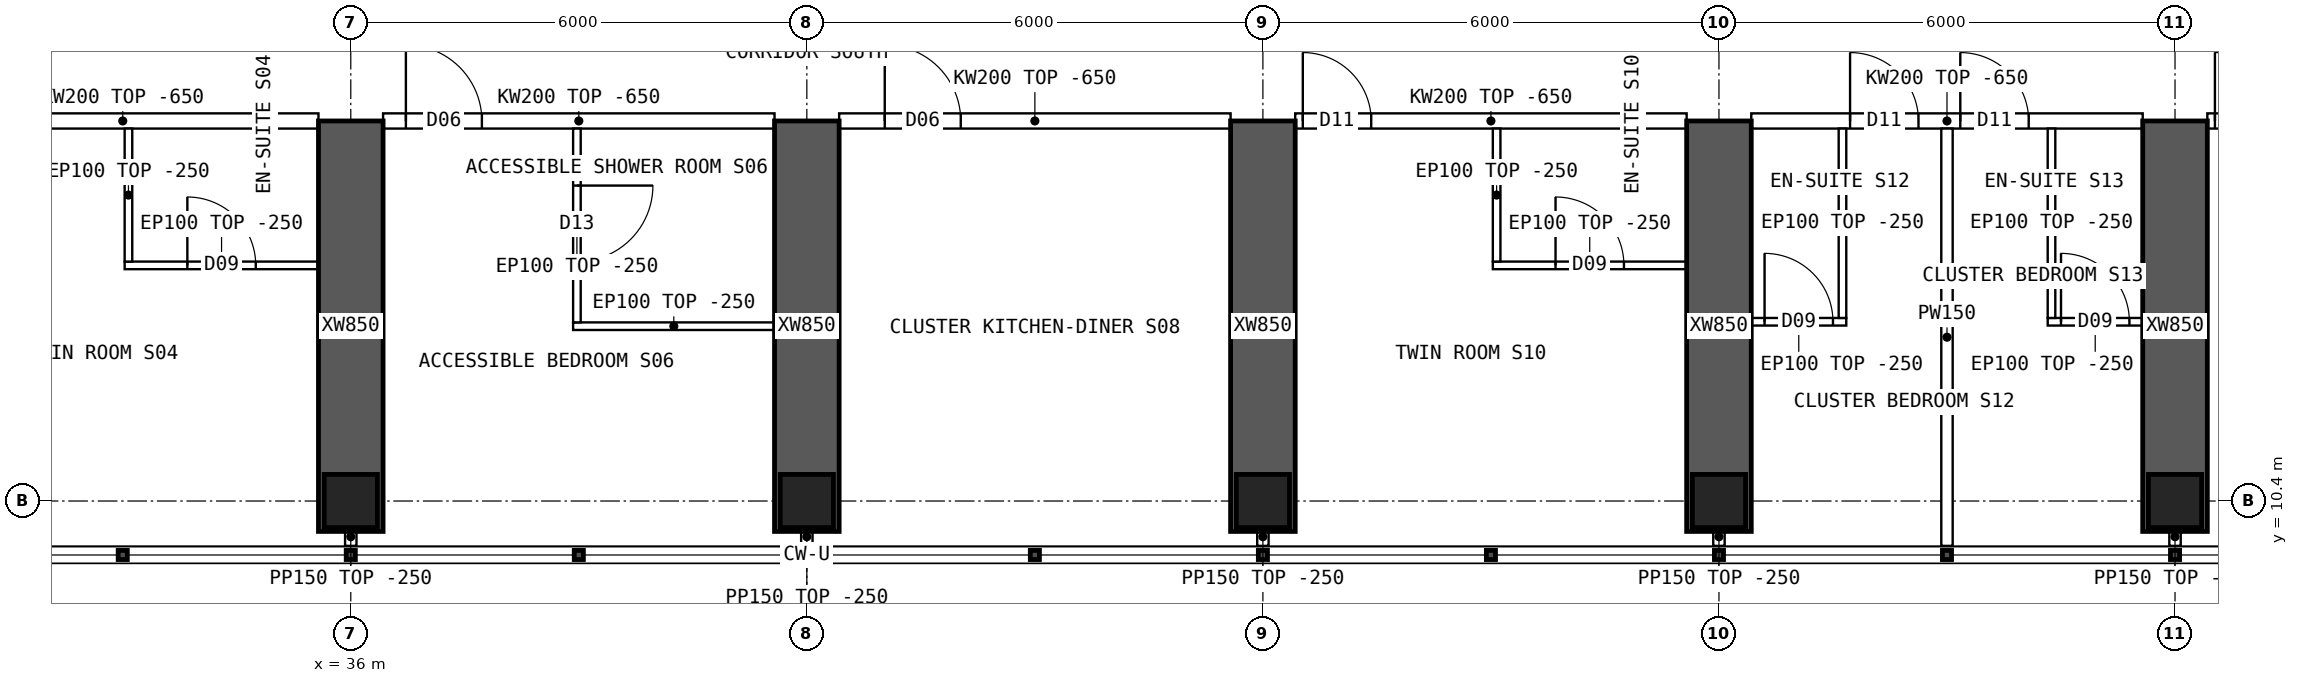
"""IFC4 building model, lengths in metres.
Left out: names, types, materials, properties, quantities, classifications, styles, units other than length and angle.
Written with IfcOpenShell. Run it as: python <this file> out.ifc"""

import sys

from ifc_helpers import new_model, si_unit, direction, frame, frame_2d, origin, origin_2d, place, context, subcontext, project, spatial, polyline, rectangle, hollow_rectangle, outline, extrude, element, fill, save


model = new_model("IFC4")
c1 = context("Model", 3, precision=1e-05, world=origin(), true_north=direction((0.0, 1.0)))
c2 = subcontext(c1, "Body", "Model", "MODEL_VIEW")
j1 = project(units=[si_unit("LENGTHUNIT", "METRE"), si_unit("PLANEANGLEUNIT", "RADIAN")], contexts=[c1])
p1 = place(None, origin())
s1 = spatial("IfcSite", under=j1, at=p1, CompositionType="ELEMENT")
p2 = place(p1, origin())
s2 = spatial("IfcBuilding", under=s1, at=p2, CompositionType="ELEMENT")
p3 = place(p2, frame((0.0, 0.0, 193.6)))
s3 = spatial("IfcBuildingStorey", under=s2, at=p3, CompositionType="ELEMENT", Elevation=193.6)
for number, where, z_axis, x_axis in (
    (1, (36.0, 10.4, 0.0), (0.0, 0.0, 1.0), (1.0, 0.0, 0.0)),
    (2, (42.0, 10.4, 0.0), (0.0, 0.0, 1.0), (1.0, 0.0, 0.0)),
    (3, (48.0, 10.4, 0.0), (0.0, 0.0, 1.0), (1.0, 0.0, 0.0)),
    (4, (54.0, 10.4, 0.0), (0.0, 0.0, 1.0), (1.0, 0.0, 0.0)),
    (5, (60.0, 10.4, 0.0), (0.0, 0.0, 1.0), (1.0, 0.0, 0.0)),
):
    element("IfcColumn", number, at=place(p3, frame(where, z_axis=z_axis, x_axis=x_axis)), inside=s3, PredefinedType="COLUMN", context=c2, shape_type="SweptSolid", body=[
        extrude(hollow_rectangle(XDim=0.7, YDim=0.7, WallThickness=0.07, at=origin_2d()), origin(), (0.0, 0.0, 1.0), 3.75),
    ])
for number, where, z_axis, x_axis in (
    (6, (36.0, 10.0, 0.0), (0.0, 0.0, 1.0), (0.0, 1.0, 0.0)),
    (7, (42.0, 10.0, 0.0), (0.0, 0.0, 1.0), (0.0, 1.0, 0.0)),
    (8, (48.0, 10.0, 0.0), (0.0, 0.0, 1.0), (0.0, 1.0, 0.0)),
    (9, (54.0, 10.0, 0.0), (0.0, 0.0, 1.0), (0.0, 1.0, 0.0)),
    (10, (60.0, 10.0, 0.0), (0.0, 0.0, 1.0), (0.0, 1.0, 0.0)),
):
    element("IfcWall", number, at=place(p3, frame(where, z_axis=z_axis, x_axis=x_axis)), inside=s3, PredefinedType="SHEAR", context=c2, shape_type="SweptSolid", body=[
        extrude(rectangle(XDim=5.4, YDim=0.85, at=frame_2d((2.7, 0.0))), origin(), (0.0, 0.0, 1.0), 3.75),
    ])
p4 = place(p3, frame((30.425, 15.4, 0.0), z_axis=(0.0, 0.0, 1.0), x_axis=(1.0, 0.0, 0.0)))
e11 = element("IfcWall", 11, at=p4, inside=s3, PredefinedType="SOLIDWALL", context=c2, shape_type="SweptSolid", body=[
    extrude(outline(polyline([(0.0, 0.0), (5.15, 0.0), (5.15, 3.1), (0.0, 3.1), (0.0, 0.0)])), frame((0.0, 0.1, 0.0), z_axis=(0.0, -1.0, 0.0), x_axis=(1.0, 0.0, 0.0)), (0.0, 0.0, 1.0), 0.2),
])
p5 = place(p4, frame((0.1, 0.0, 0.0)))
e12 = element("IfcOpeningElement", 12, at=p5, cuts=e11, PredefinedType="OPENING", context=c2, shape_type="SweptSolid", body=[
    extrude(rectangle(XDim=0.9, YDim=2.1, at=frame_2d((0.45, 1.05))), frame((0.0, 0.11, 0.0), z_axis=(0.0, -1.0, 0.0), x_axis=(1.0, 0.0, 0.0)), (0.0, 0.0, 1.0), 0.22),
])
p6 = place(p3, frame((36.425, 15.4, 0.0), z_axis=(0.0, 0.0, 1.0), x_axis=(1.0, 0.0, 0.0)))
e13 = element("IfcWall", 13, at=p6, inside=s3, PredefinedType="SOLIDWALL", context=c2, shape_type="SweptSolid", body=[
    extrude(outline(polyline([(0.0, 0.0), (5.15, 0.0), (5.15, 3.1), (0.0, 3.1), (0.0, 0.0)])), frame((0.0, 0.1, 0.0), z_axis=(0.0, -1.0, 0.0), x_axis=(1.0, 0.0, 0.0)), (0.0, 0.0, 1.0), 0.2),
])
p7 = place(p6, frame((0.3, 0.0, 0.0)))
e14 = element("IfcOpeningElement", 14, at=p7, cuts=e13, PredefinedType="OPENING", context=c2, shape_type="SweptSolid", body=[
    extrude(rectangle(XDim=1.0, YDim=2.1, at=frame_2d((0.5, 1.05))), frame((0.0, 0.11, 0.0), z_axis=(0.0, -1.0, 0.0), x_axis=(1.0, 0.0, 0.0)), (0.0, 0.0, 1.0), 0.22),
])
p8 = place(p3, frame((42.425, 15.4, 0.0), z_axis=(0.0, 0.0, 1.0), x_axis=(1.0, 0.0, 0.0)))
e15 = element("IfcWall", 15, at=p8, inside=s3, PredefinedType="SOLIDWALL", context=c2, shape_type="SweptSolid", body=[
    extrude(outline(polyline([(0.0, 0.0), (5.15, 0.0), (5.15, 3.1), (0.0, 3.1), (0.0, 0.0)])), frame((0.0, 0.1, 0.0), z_axis=(0.0, -1.0, 0.0), x_axis=(1.0, 0.0, 0.0)), (0.0, 0.0, 1.0), 0.2),
])
p9 = place(p8, frame((0.6, 0.0, 0.0)))
e16 = element("IfcOpeningElement", 16, at=p9, cuts=e15, PredefinedType="OPENING", context=c2, shape_type="SweptSolid", body=[
    extrude(rectangle(XDim=1.0, YDim=2.1, at=frame_2d((0.5, 1.05))), frame((0.0, 0.11, 0.0), z_axis=(0.0, -1.0, 0.0), x_axis=(1.0, 0.0, 0.0)), (0.0, 0.0, 1.0), 0.22),
])
p10 = place(p3, frame((48.425, 15.4, 0.0), z_axis=(0.0, 0.0, 1.0), x_axis=(1.0, 0.0, 0.0)))
e17 = element("IfcWall", 17, at=p10, inside=s3, PredefinedType="SOLIDWALL", context=c2, shape_type="SweptSolid", body=[
    extrude(outline(polyline([(0.0, 0.0), (5.15, 0.0), (5.15, 3.1), (0.0, 3.1), (0.0, 0.0)])), frame((0.0, 0.1, 0.0), z_axis=(0.0, -1.0, 0.0), x_axis=(1.0, 0.0, 0.0)), (0.0, 0.0, 1.0), 0.2),
])
p11 = place(p10, frame((0.1, 0.0, 0.0)))
e18 = element("IfcOpeningElement", 18, at=p11, cuts=e17, PredefinedType="OPENING", context=c2, shape_type="SweptSolid", body=[
    extrude(rectangle(XDim=0.9, YDim=2.1, at=frame_2d((0.45, 1.05))), frame((0.0, 0.11, 0.0), z_axis=(0.0, -1.0, 0.0), x_axis=(1.0, 0.0, 0.0)), (0.0, 0.0, 1.0), 0.22),
])
p12 = place(p3, frame((54.425, 15.4, 0.0), z_axis=(0.0, 0.0, 1.0), x_axis=(1.0, 0.0, 0.0)))
e19 = element("IfcWall", 19, at=p12, inside=s3, PredefinedType="SOLIDWALL", context=c2, shape_type="SweptSolid", body=[
    extrude(outline(polyline([(0.0, 0.0), (5.15, 0.0), (5.15, 3.1), (0.0, 3.1), (0.0, 0.0)])), frame((0.0, 0.1, 0.0), z_axis=(0.0, -1.0, 0.0), x_axis=(1.0, 0.0, 0.0)), (0.0, 0.0, 1.0), 0.2),
])
p13 = place(p12, frame((1.3, 0.0, 0.0)))
e20 = element("IfcOpeningElement", 20, at=p13, cuts=e19, PredefinedType="OPENING", context=c2, shape_type="SweptSolid", body=[
    extrude(rectangle(XDim=0.9, YDim=2.1, at=frame_2d((0.45, 1.05))), frame((0.0, 0.11, 0.0), z_axis=(0.0, -1.0, 0.0), x_axis=(1.0, 0.0, 0.0)), (0.0, 0.0, 1.0), 0.22),
])
p14 = place(p12, frame((2.75, 0.0, 0.0)))
e21 = element("IfcOpeningElement", 21, at=p14, cuts=e19, PredefinedType="OPENING", context=c2, shape_type="SweptSolid", body=[
    extrude(rectangle(XDim=0.9, YDim=2.1, at=frame_2d((0.45, 1.05))), frame((0.0, 0.11, 0.0), z_axis=(0.0, -1.0, 0.0), x_axis=(1.0, 0.0, 0.0)), (0.0, 0.0, 1.0), 0.22),
])
p15 = place(p3, frame((60.425, 15.4, 0.0), z_axis=(0.0, 0.0, 1.0), x_axis=(1.0, 0.0, 0.0)))
e22 = element("IfcWall", 22, at=p15, inside=s3, PredefinedType="SOLIDWALL", context=c2, shape_type="SweptSolid", body=[
    extrude(outline(polyline([(0.0, 0.0), (5.15, 0.0), (5.15, 3.1), (0.0, 3.1), (0.0, 0.0)])), frame((0.0, 0.1, 0.0), z_axis=(0.0, -1.0, 0.0), x_axis=(1.0, 0.0, 0.0)), (0.0, 0.0, 1.0), 0.2),
])
p16 = place(p15, frame((0.1, 0.0, 0.0)))
e23 = element("IfcOpeningElement", 23, at=p16, cuts=e22, PredefinedType="OPENING", context=c2, shape_type="SweptSolid", body=[
    extrude(rectangle(XDim=0.9, YDim=2.1, at=frame_2d((0.45, 1.05))), frame((0.0, 0.11, 0.0), z_axis=(0.0, -1.0, 0.0), x_axis=(1.0, 0.0, 0.0)), (0.0, 0.0, 1.0), 0.22),
])
p17 = place(p3, frame((35.575, 13.5, 0.0), z_axis=(0.0, 0.0, 1.0), x_axis=(-1.0, 0.0, 0.0)))
e24 = element("IfcWall", 24, at=p17, inside=s3, PredefinedType="PARTITIONING", context=c2, shape_type="SweptSolid", body=[
    extrude(rectangle(XDim=2.55, YDim=0.1, at=frame_2d((1.275, 0.0))), origin(), (0.0, 0.0, 1.0), 3.5),
])
p18 = place(p17, frame((0.825, 0.0, 0.0)))
e25 = element("IfcOpeningElement", 25, at=p18, cuts=e24, PredefinedType="OPENING", context=c2, shape_type="SweptSolid", body=[
    extrude(rectangle(XDim=0.9, YDim=2.1, at=frame_2d((0.45, 1.05))), frame((0.0, 0.06, 0.0), z_axis=(0.0, -1.0, 0.0), x_axis=(1.0, 0.0, 0.0)), (0.0, 0.0, 1.0), 0.12),
])
p19 = place(p3, frame((33.075, 13.55, 0.0), z_axis=(0.0, 0.0, 1.0), x_axis=(0.0, 1.0, 0.0)))
e26 = element("IfcWall", 26, at=p19, inside=s3, PredefinedType="PARTITIONING", context=c2, shape_type="SweptSolid", body=[
    extrude(outline(polyline([(0.0, 0.0), (1.75, 0.0), (1.75, 3.1), (1.702, 3.1), (1.7, 3.5), (0.0, 3.5), (0.0, 0.0)])), frame((0.0, 0.05, 0.0), z_axis=(0.0, -1.0, 0.0), x_axis=(1.0, 0.0, 0.0)), (0.0, 0.0, 1.0), 0.1),
])
p20 = place(p3, frame((38.925, 12.7, 0.0), z_axis=(0.0, 0.0, 1.0), x_axis=(1.0, 0.0, 0.0)))
e27 = element("IfcWall", 27, at=p20, inside=s3, PredefinedType="PARTITIONING", context=c2, shape_type="SweptSolid", body=[
    extrude(rectangle(XDim=2.65, YDim=0.1, at=frame_2d((1.325, 0.0))), origin(), (0.0, 0.0, 1.0), 3.5),
])
p21 = place(p3, frame((38.975, 12.75, 0.0), z_axis=(0.0, 0.0, 1.0), x_axis=(0.0, 1.0, 0.0)))
e28 = element("IfcWall", 28, at=p21, inside=s3, PredefinedType="PARTITIONING", context=c2, shape_type="SweptSolid", body=[
    extrude(outline(polyline([(0.0, 0.0), (2.55, 0.0), (2.55, 3.1), (2.502, 3.1), (2.5, 3.5), (0.0, 3.5), (0.0, 0.0)])), frame((0.0, 0.05, 0.0), z_axis=(0.0, -1.0, 0.0), x_axis=(1.0, 0.0, 0.0)), (0.0, 0.0, 1.0), 0.1),
])
p22 = place(p21, frame((0.8, 0.0, 0.0)))
e29 = element("IfcOpeningElement", 29, at=p22, cuts=e28, PredefinedType="OPENING", context=c2, shape_type="SweptSolid", body=[
    extrude(rectangle(XDim=1.0, YDim=2.1, at=frame_2d((0.5, 1.05))), frame((0.0, 0.06, 0.0), z_axis=(0.0, -1.0, 0.0), x_axis=(1.0, 0.0, 0.0)), (0.0, 0.0, 1.0), 0.12),
])
p23 = place(p3, frame((53.575, 13.5, 0.0), z_axis=(0.0, 0.0, 1.0), x_axis=(-1.0, 0.0, 0.0)))
e30 = element("IfcWall", 30, at=p23, inside=s3, PredefinedType="PARTITIONING", context=c2, shape_type="SweptSolid", body=[
    extrude(rectangle(XDim=2.55, YDim=0.1, at=frame_2d((1.275, 0.0))), origin(), (0.0, 0.0, 1.0), 3.5),
])
p24 = place(p23, frame((0.825, 0.0, 0.0)))
e31 = element("IfcOpeningElement", 31, at=p24, cuts=e30, PredefinedType="OPENING", context=c2, shape_type="SweptSolid", body=[
    extrude(rectangle(XDim=0.9, YDim=2.1, at=frame_2d((0.45, 1.05))), frame((0.0, 0.06, 0.0), z_axis=(0.0, -1.0, 0.0), x_axis=(1.0, 0.0, 0.0)), (0.0, 0.0, 1.0), 0.12),
])
p25 = place(p3, frame((51.075, 13.55, 0.0), z_axis=(0.0, 0.0, 1.0), x_axis=(0.0, 1.0, 0.0)))
e32 = element("IfcWall", 32, at=p25, inside=s3, PredefinedType="PARTITIONING", context=c2, shape_type="SweptSolid", body=[
    extrude(outline(polyline([(0.0, 0.0), (1.75, 0.0), (1.75, 3.1), (1.702, 3.1), (1.7, 3.5), (0.0, 3.5), (0.0, 0.0)])), frame((0.0, 0.05, 0.0), z_axis=(0.0, -1.0, 0.0), x_axis=(1.0, 0.0, 0.0)), (0.0, 0.0, 1.0), 0.1),
])
p26 = place(p3, frame((57.0, 9.81, 0.0), z_axis=(0.0, 0.0, 1.0), x_axis=(0.0, 1.0, 0.0)))
e33 = element("IfcWall", 33, at=p26, inside=s3, PredefinedType="PARTITIONING", context=c2, shape_type="SweptSolid", body=[
    extrude(outline(polyline([(0.0, 0.0), (5.49, 0.0), (5.49, 3.1), (5.442, 3.1), (5.44, 3.5), (0.792, 3.5), (0.79, 3.1), (0.392, 3.1), (0.39, 3.5), (0.0, 3.5), (0.0, 0.0)])), frame((0.0, 0.075, 0.0), z_axis=(0.0, -1.0, 0.0), x_axis=(1.0, 0.0, 0.0)), (0.0, 0.0, 1.0), 0.15),
])
p27 = place(p3, frame((55.675, 12.758, 0.0), z_axis=(0.0, 0.0, 1.0), x_axis=(-1.0, 0.0, 0.0)))
e34 = element("IfcWall", 34, at=p27, inside=s3, PredefinedType="PARTITIONING", context=c2, shape_type="SweptSolid", body=[
    extrude(rectangle(XDim=1.25, YDim=0.1, at=frame_2d((0.625, 0.0))), origin(), (0.0, 0.0, 1.0), 3.5),
])
p28 = place(p27, frame((0.175, 0.0, 0.0)))
e35 = element("IfcOpeningElement", 35, at=p28, cuts=e34, PredefinedType="OPENING", context=c2, shape_type="SweptSolid", body=[
    extrude(rectangle(XDim=0.9, YDim=2.1, at=frame_2d((0.45, 1.05))), frame((0.0, 0.06, 0.0), z_axis=(0.0, -1.0, 0.0), x_axis=(1.0, 0.0, 0.0)), (0.0, 0.0, 1.0), 0.12),
])
p29 = place(p3, frame((55.625, 12.808, 0.0), z_axis=(0.0, 0.0, 1.0), x_axis=(0.0, 1.0, 0.0)))
e36 = element("IfcWall", 36, at=p29, inside=s3, PredefinedType="PARTITIONING", context=c2, shape_type="SweptSolid", body=[
    extrude(outline(polyline([(0.0, 0.0), (2.492, 0.0), (2.492, 3.1), (2.444, 3.1), (2.442, 3.5), (0.0, 3.5), (0.0, 0.0)])), frame((0.0, 0.05, 0.0), z_axis=(0.0, -1.0, 0.0), x_axis=(1.0, 0.0, 0.0)), (0.0, 0.0, 1.0), 0.1),
])
p30 = place(p3, frame((59.575, 12.758, 0.0), z_axis=(0.0, 0.0, 1.0), x_axis=(-1.0, 0.0, 0.0)))
e37 = element("IfcWall", 37, at=p30, inside=s3, PredefinedType="PARTITIONING", context=c2, shape_type="SweptSolid", body=[
    extrude(rectangle(XDim=1.25, YDim=0.1, at=frame_2d((0.625, 0.0))), origin(), (0.0, 0.0, 1.0), 3.5),
])
p31 = place(p30, frame((0.175, 0.0, 0.0)))
e38 = element("IfcOpeningElement", 38, at=p31, cuts=e37, PredefinedType="OPENING", context=c2, shape_type="SweptSolid", body=[
    extrude(rectangle(XDim=0.9, YDim=2.1, at=frame_2d((0.45, 1.05))), frame((0.0, 0.06, 0.0), z_axis=(0.0, -1.0, 0.0), x_axis=(1.0, 0.0, 0.0)), (0.0, 0.0, 1.0), 0.12),
])
p32 = place(p3, frame((58.375, 12.808, 0.0), z_axis=(0.0, 0.0, 1.0), x_axis=(0.0, 1.0, 0.0)))
e39 = element("IfcWall", 39, at=p32, inside=s3, PredefinedType="PARTITIONING", context=c2, shape_type="SweptSolid", body=[
    extrude(outline(polyline([(0.0, 0.0), (2.492, 0.0), (2.492, 3.1), (2.444, 3.1), (2.442, 3.5), (0.0, 3.5), (0.0, 0.0)])), frame((0.0, 0.05, 0.0), z_axis=(0.0, -1.0, 0.0), x_axis=(1.0, 0.0, 0.0)), (0.0, 0.0, 1.0), 0.1),
])
for number, where, z_axis, x_axis in (
    (40, (36.0, 10.05, 0.0), (0.0, 0.0, 1.0), (0.0, -1.0, 0.0)),
    (41, (42.0, 10.05, 0.0), (0.0, 0.0, 1.0), (0.0, -1.0, 0.0)),
    (42, (48.0, 10.05, 0.0), (0.0, 0.0, 1.0), (0.0, -1.0, 0.0)),
    (43, (54.0, 10.05, 0.0), (0.0, 0.0, 1.0), (0.0, -1.0, 0.0)),
    (44, (60.0, 10.05, 0.0), (0.0, 0.0, 1.0), (0.0, -1.0, 0.0)),
):
    element("IfcWall", number, at=place(p3, frame(where, z_axis=z_axis, x_axis=x_axis)), inside=s3, PredefinedType="PARTITIONING", context=c2, shape_type="SweptSolid", body=[
        extrude(rectangle(XDim=0.24, YDim=0.15, at=frame_2d((0.12, 0.0))), origin(), (0.0, 0.0, 1.0), 3.5),
    ])
p33 = place(p18, origin())
e45 = element("IfcDoor", 45, at=p33, inside=s3, OperationType="SINGLE_SWING_RIGHT", PredefinedType="DOOR", context=c2, shape_type="SweptSolid", body=[
    extrude(rectangle(XDim=0.9, YDim=2.1, at=frame_2d((0.45, 1.05))), frame((0.0, 0.025, 0.0), z_axis=(0.0, -1.0, 0.0), x_axis=(1.0, 0.0, 0.0)), (0.0, 0.0, 1.0), 0.05),
])
fill(e25, e45)
p34 = place(p22, origin())
e46 = element("IfcDoor", 46, at=p34, inside=s3, OperationType="SINGLE_SWING_RIGHT", PredefinedType="DOOR", context=c2, shape_type="SweptSolid", body=[
    extrude(rectangle(XDim=1.0, YDim=2.1, at=frame_2d((0.5, 1.05))), frame((0.0, 0.025, 0.0), z_axis=(0.0, -1.0, 0.0), x_axis=(1.0, 0.0, 0.0)), (0.0, 0.0, 1.0), 0.05),
])
fill(e29, e46)
p35 = place(p7, origin())
e47 = element("IfcDoor", 47, at=p35, inside=s3, OperationType="SINGLE_SWING_LEFT", PredefinedType="DOOR", context=c2, shape_type="SweptSolid", body=[
    extrude(rectangle(XDim=1.0, YDim=2.1, at=frame_2d((0.5, 1.05))), frame((0.0, 0.025, 0.0), z_axis=(0.0, -1.0, 0.0), x_axis=(1.0, 0.0, 0.0)), (0.0, 0.0, 1.0), 0.05),
])
fill(e14, e47)
p36 = place(p9, origin())
e48 = element("IfcDoor", 48, at=p36, inside=s3, OperationType="SINGLE_SWING_LEFT", PredefinedType="DOOR", context=c2, shape_type="SweptSolid", body=[
    extrude(rectangle(XDim=1.0, YDim=2.1, at=frame_2d((0.5, 1.05))), frame((0.0, 0.025, 0.0), z_axis=(0.0, -1.0, 0.0), x_axis=(1.0, 0.0, 0.0)), (0.0, 0.0, 1.0), 0.05),
])
fill(e16, e48)
p37 = place(p24, origin())
e49 = element("IfcDoor", 49, at=p37, inside=s3, OperationType="SINGLE_SWING_RIGHT", PredefinedType="DOOR", context=c2, shape_type="SweptSolid", body=[
    extrude(rectangle(XDim=0.9, YDim=2.1, at=frame_2d((0.45, 1.05))), frame((0.0, 0.025, 0.0), z_axis=(0.0, -1.0, 0.0), x_axis=(1.0, 0.0, 0.0)), (0.0, 0.0, 1.0), 0.05),
])
fill(e31, e49)
p38 = place(p11, origin())
e50 = element("IfcDoor", 50, at=p38, inside=s3, OperationType="SINGLE_SWING_LEFT", PredefinedType="DOOR", context=c2, shape_type="SweptSolid", body=[
    extrude(rectangle(XDim=0.9, YDim=2.1, at=frame_2d((0.45, 1.05))), frame((0.0, 0.025, 0.0), z_axis=(0.0, -1.0, 0.0), x_axis=(1.0, 0.0, 0.0)), (0.0, 0.0, 1.0), 0.05),
])
fill(e18, e50)
p39 = place(p28, origin())
e51 = element("IfcDoor", 51, at=p39, inside=s3, OperationType="SINGLE_SWING_RIGHT", PredefinedType="DOOR", context=c2, shape_type="SweptSolid", body=[
    extrude(rectangle(XDim=0.9, YDim=2.1, at=frame_2d((0.45, 1.05))), frame((0.0, 0.025, 0.0), z_axis=(0.0, -1.0, 0.0), x_axis=(1.0, 0.0, 0.0)), (0.0, 0.0, 1.0), 0.05),
])
fill(e35, e51)
p40 = place(p13, origin())
e52 = element("IfcDoor", 52, at=p40, inside=s3, OperationType="SINGLE_SWING_LEFT", PredefinedType="DOOR", context=c2, shape_type="SweptSolid", body=[
    extrude(rectangle(XDim=0.9, YDim=2.1, at=frame_2d((0.45, 1.05))), frame((0.0, 0.025, 0.0), z_axis=(0.0, -1.0, 0.0), x_axis=(1.0, 0.0, 0.0)), (0.0, 0.0, 1.0), 0.05),
])
fill(e20, e52)
p41 = place(p31, origin())
e53 = element("IfcDoor", 53, at=p41, inside=s3, OperationType="SINGLE_SWING_RIGHT", PredefinedType="DOOR", context=c2, shape_type="SweptSolid", body=[
    extrude(rectangle(XDim=0.9, YDim=2.1, at=frame_2d((0.45, 1.05))), frame((0.0, 0.025, 0.0), z_axis=(0.0, -1.0, 0.0), x_axis=(1.0, 0.0, 0.0)), (0.0, 0.0, 1.0), 0.05),
])
fill(e38, e53)
p42 = place(p14, origin())
e54 = element("IfcDoor", 54, at=p42, inside=s3, OperationType="SINGLE_SWING_LEFT", PredefinedType="DOOR", context=c2, shape_type="SweptSolid", body=[
    extrude(rectangle(XDim=0.9, YDim=2.1, at=frame_2d((0.45, 1.05))), frame((0.0, 0.025, 0.0), z_axis=(0.0, -1.0, 0.0), x_axis=(1.0, 0.0, 0.0)), (0.0, 0.0, 1.0), 0.05),
])
fill(e21, e54)
p43 = place(p16, origin())
e55 = element("IfcDoor", 55, at=p43, inside=s3, OperationType="SINGLE_SWING_LEFT", PredefinedType="DOOR", context=c2, shape_type="SweptSolid", body=[
    extrude(rectangle(XDim=0.9, YDim=2.1, at=frame_2d((0.45, 1.05))), frame((0.0, 0.025, 0.0), z_axis=(0.0, -1.0, 0.0), x_axis=(1.0, 0.0, 0.0)), (0.0, 0.0, 1.0), 0.05),
])
fill(e23, e55)
save(model, sys.argv[1])
